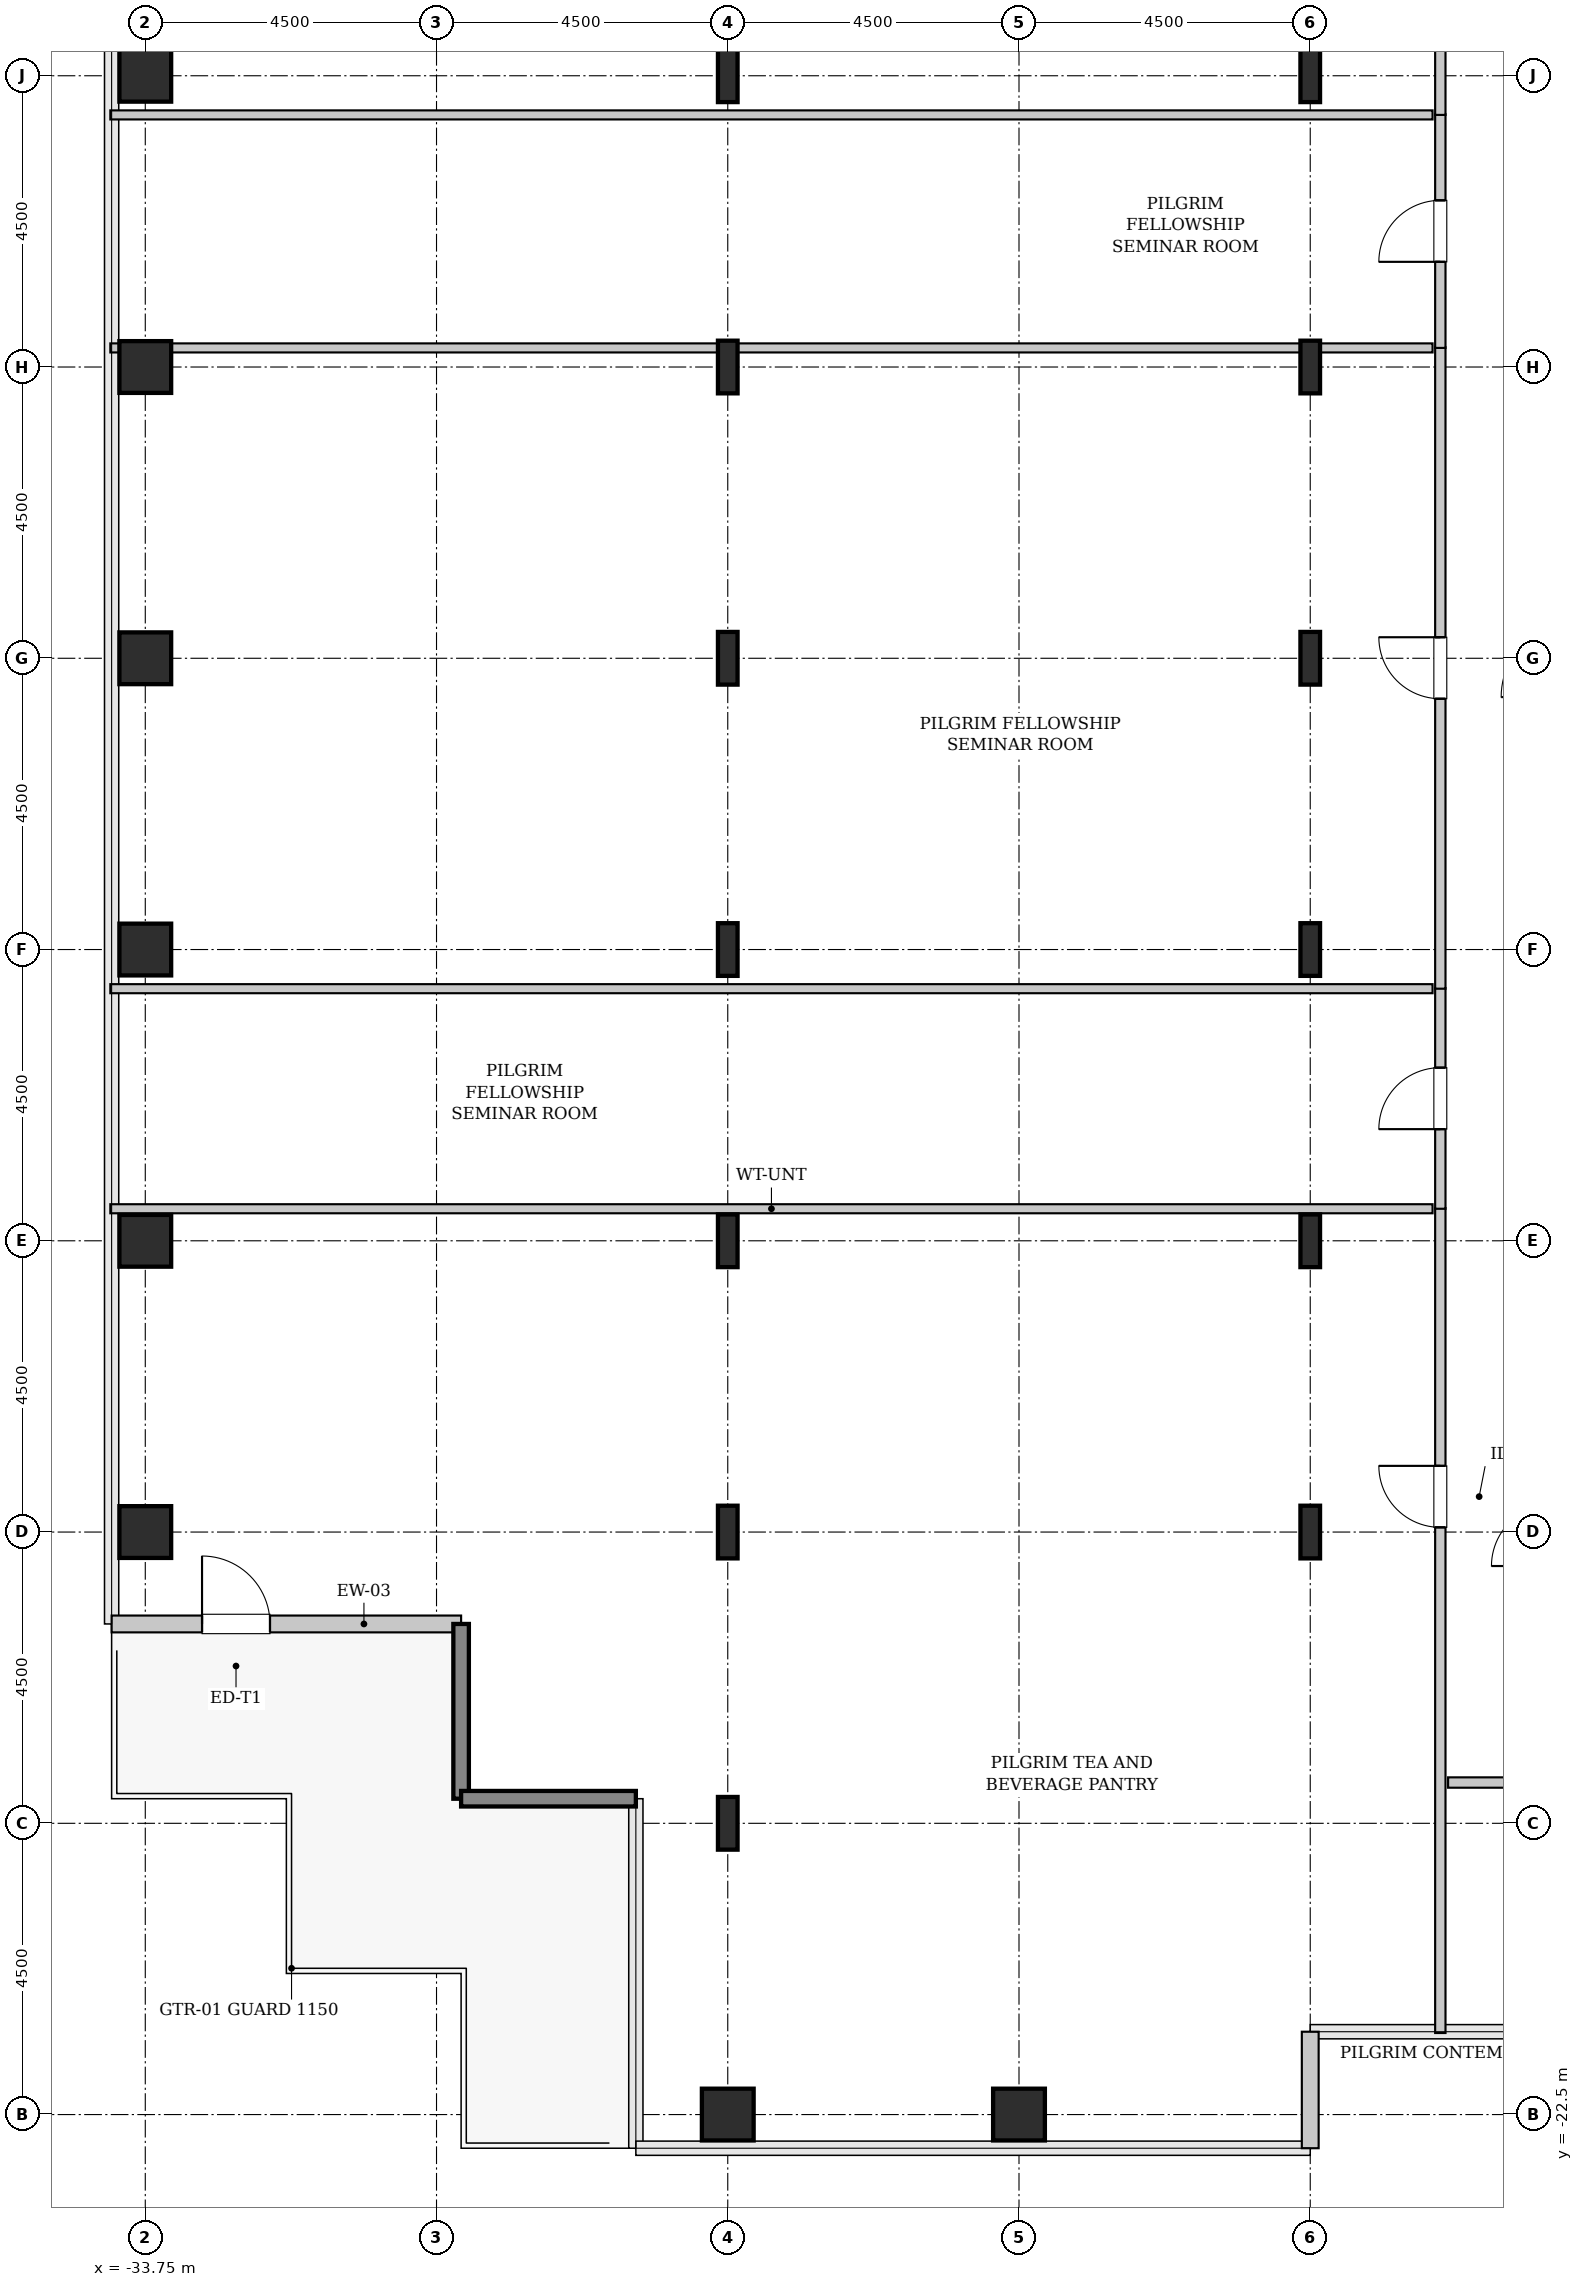
"""IFC4 building model, lengths in metres.
Left out: names, types, materials, properties, quantities, classifications, styles, units other than length and angle.
Written with IfcOpenShell. Run it as: python <this file> out.ifc"""

import sys

from ifc_helpers import new_model, si_unit, direction, frame, frame_2d, origin, origin_2d, place, context, subcontext, project, spatial, rectangle, hollow_rectangle, i_section, extrude, source, transform, mapped, element, fill, save


model = new_model("IFC4")
c1 = context("Model", 3, precision=1e-05, world=origin(), true_north=direction((0.0, 1.0)))
c2 = subcontext(c1, "Body", "Model", "MODEL_VIEW")
j1 = project(units=[si_unit("LENGTHUNIT", "METRE"), si_unit("PLANEANGLEUNIT", "RADIAN")], contexts=[c1])
p1 = place(None, origin())
s1 = spatial("IfcSite", under=j1, at=p1, CompositionType="ELEMENT")
p2 = place(p1, origin())
s2 = spatial("IfcBuilding", under=s1, at=p2, CompositionType="ELEMENT")
p3 = place(p2, frame((0.0, 0.0, 164.0)))
s3 = spatial("IfcBuildingStorey", under=s2, at=p3, CompositionType="ELEMENT", Elevation=164.0)
m1 = source(origin(), c2, "Body", "SweptSolid", [
    extrude(hollow_rectangle(XDim=0.8, YDim=0.8, WallThickness=0.04, InnerFilletRadius=0.04, OuterFilletRadius=0.08, at=origin_2d()), origin(), (0.0, 0.0, 1.0), 3.8),
])
for number, where, z_axis, x_axis in (
    (1, (-33.75, -13.5, 0.0), (0.0, 0.0, 1.0), (1.0, 0.0, 0.0)),
    (2, (-33.75, -9.0, 0.0), (0.0, 0.0, 1.0), (1.0, 0.0, 0.0)),
    (3, (-33.75, -4.5, 0.0), (0.0, 0.0, 1.0), (1.0, 0.0, 0.0)),
    (4, (-33.75, 0.0, 0.0), (0.0, 0.0, 1.0), (1.0, 0.0, 0.0)),
    (5, (-33.75, 4.5, 0.0), (0.0, 0.0, 1.0), (1.0, 0.0, 0.0)),
    (6, (-33.75, 9.0, 0.0), (0.0, 0.0, 1.0), (1.0, 0.0, 0.0)),
    (7, (-24.75, -22.5, 0.0), (0.0, 0.0, 1.0), (1.0, 0.0, 0.0)),
):
    element("IfcColumn", number, at=place(p3, frame(where, z_axis=z_axis, x_axis=x_axis)), inside=s3, PredefinedType="COLUMN", context=c2, shape_type="MappedRepresentation", body=[
        mapped(m1, transform((0.0, 0.0, 0.0), x_axis=(1.0, 0.0, 0.0), y_axis=(0.0, 1.0, 0.0), z_axis=(0.0, 0.0, 1.0), scale=1.0)),
    ])
m2 = source(origin(), c2, "Body", "SweptSolid", [
    extrude(i_section(OverallWidth=0.303, OverallDepth=0.814, WebThickness=0.021, FlangeThickness=0.04, FilletRadius=0.03, at=origin_2d()), origin(), (0.0, 0.0, 1.0), 3.8),
])
for number, where, z_axis, x_axis in (
    (8, (-24.75, -18.0, 0.0), (0.0, 0.0, 1.0), (1.0, 0.0, 0.0)),
    (9, (-24.75, -13.5, 0.0), (0.0, 0.0, 1.0), (1.0, 0.0, 0.0)),
    (10, (-24.75, -9.0, 0.0), (0.0, 0.0, 1.0), (1.0, 0.0, 0.0)),
    (11, (-24.75, -4.5, 0.0), (0.0, 0.0, 1.0), (1.0, 0.0, 0.0)),
    (12, (-24.75, 0.0, 0.0), (0.0, 0.0, 1.0), (1.0, 0.0, 0.0)),
    (13, (-24.75, 4.5, 0.0), (0.0, 0.0, 1.0), (1.0, 0.0, 0.0)),
    (14, (-24.75, 9.0, 0.0), (0.0, 0.0, 1.0), (1.0, 0.0, 0.0)),
):
    element("IfcColumn", number, at=place(p3, frame(where, z_axis=z_axis, x_axis=x_axis)), inside=s3, PredefinedType="COLUMN", context=c2, shape_type="MappedRepresentation", body=[
        mapped(m2, transform((0.0, 0.0, 0.0), x_axis=(1.0, 0.0, 0.0), y_axis=(0.0, 1.0, 0.0), z_axis=(0.0, 0.0, 1.0), scale=1.0)),
    ])
p4 = place(p3, frame((-20.25, -22.5, 0.0), z_axis=(0.0, 0.0, 1.0), x_axis=(1.0, 0.0, 0.0)))
e15 = element("IfcColumn", 15, at=p4, inside=s3, PredefinedType="COLUMN", context=c2, shape_type="MappedRepresentation", body=[
    mapped(m1, transform((0.0, 0.0, 0.0), x_axis=(1.0, 0.0, 0.0), y_axis=(0.0, 1.0, 0.0), z_axis=(0.0, 0.0, 1.0), scale=1.0)),
])
for number, where, z_axis, x_axis in (
    (16, (-15.75, -13.5, 0.0), (0.0, 0.0, 1.0), (1.0, 0.0, 0.0)),
    (17, (-15.75, -9.0, 0.0), (0.0, 0.0, 1.0), (1.0, 0.0, 0.0)),
    (18, (-15.75, -4.5, 0.0), (0.0, 0.0, 1.0), (1.0, 0.0, 0.0)),
    (19, (-15.75, 0.0, 0.0), (0.0, 0.0, 1.0), (1.0, 0.0, 0.0)),
    (20, (-15.75, 4.5, 0.0), (0.0, 0.0, 1.0), (1.0, 0.0, 0.0)),
    (21, (-15.75, 9.0, 0.0), (0.0, 0.0, 1.0), (1.0, 0.0, 0.0)),
):
    element("IfcColumn", number, at=place(p3, frame(where, z_axis=z_axis, x_axis=x_axis)), inside=s3, PredefinedType="COLUMN", context=c2, shape_type="MappedRepresentation", body=[
        mapped(m2, transform((0.0, 0.0, 0.0), x_axis=(1.0, 0.0, 0.0), y_axis=(0.0, 1.0, 0.0), z_axis=(0.0, 0.0, 1.0), scale=1.0)),
    ])
m3 = source(origin(), c2, "Body", "SweptSolid", [
    extrude(rectangle(XDim=5.4, YDim=0.26, at=frame_2d((2.7, 0.0))), origin(), (0.0, 0.0, 1.0), 3.55),
])
p5 = place(p3, frame((-34.27, -14.92, 0.0), z_axis=(0.0, 0.0, 1.0), x_axis=(1.0, 0.0, 0.0)))
e22 = element("IfcWall", 22, at=p5, inside=s3, PredefinedType="SOLIDWALL", context=c2, shape_type="MappedRepresentation", body=[
    mapped(m3, transform((0.0, 0.0, 0.0), x_axis=(1.0, 0.0, 0.0), y_axis=(0.0, 1.0, 0.0), z_axis=(0.0, 0.0, 1.0), scale=1.0)),
])
p6 = place(p5, frame((1.397, 0.0, 0.0)))
e23 = element("IfcOpeningElement", 23, at=p6, cuts=e22, PredefinedType="OPENING", context=c2, shape_type="SweptSolid", body=[
    extrude(rectangle(XDim=1.05, YDim=2.2, at=frame_2d((0.525, 1.1))), frame((0.0, 0.14, 0.0), z_axis=(0.0, -1.0, 0.0), x_axis=(1.0, 0.0, 0.0)), (0.0, 0.0, 1.0), 0.28),
])
m4 = source(origin(), c2, "Body", "SweptSolid", [
    extrude(rectangle(XDim=2.7, YDim=0.24, at=frame_2d((1.35, 0.0))), origin(), (0.0, 0.0, 1.0), 3.55),
])
for number, where, z_axis, x_axis in (
    (24, (-28.87, -14.92, 0.0), (0.0, 0.0, 1.0), (0.0, -1.0, 0.0)),
    (25, (-28.87, -17.62, 0.0), (0.0, 0.0, 1.0), (1.0, 0.0, 0.0)),
):
    element("IfcWall", number, at=place(p3, frame(where, z_axis=z_axis, x_axis=x_axis)), inside=s3, PredefinedType="SHEAR", context=c2, shape_type="MappedRepresentation", body=[
        mapped(m4, transform((0.0, 0.0, 0.0), x_axis=(1.0, 0.0, 0.0), y_axis=(0.0, 1.0, 0.0), z_axis=(0.0, 0.0, 1.0), scale=1.0)),
    ])
m5 = source(origin(), c2, "Body", "SweptSolid", [
    extrude(rectangle(XDim=1.8, YDim=0.26, at=frame_2d((0.9, 0.0))), origin(), (0.0, 0.0, 1.0), 3.55),
])
p7 = place(p3, frame((-15.75, -23.02, 0.0), z_axis=(0.0, 0.0, 1.0), x_axis=(0.0, 1.0, 0.0)))
e26 = element("IfcWall", 26, at=p7, inside=s3, PredefinedType="SOLIDWALL", context=c2, shape_type="MappedRepresentation", body=[
    mapped(m5, transform((0.0, 0.0, 0.0), x_axis=(1.0, 0.0, 0.0), y_axis=(0.0, 1.0, 0.0), z_axis=(0.0, 0.0, 1.0), scale=1.0)),
])
m6 = source(origin(), c2, "Body", "SweptSolid", [
    extrude(rectangle(XDim=12.745, YDim=0.16, at=frame_2d((6.373, 0.0))), origin(), (0.0, 0.0, 1.0), 3.535),
])
p8 = place(p3, frame((-13.74, -21.24, 0.0), z_axis=(0.0, 0.0, 1.0), x_axis=(0.0, 1.0, 0.0)))
e27 = element("IfcWall", 27, at=p8, inside=s3, PredefinedType="PARTITIONING", context=c2, shape_type="MappedRepresentation", body=[
    mapped(m6, transform((0.0, 0.0, 0.0), x_axis=(1.0, 0.0, 0.0), y_axis=(0.0, 1.0, 0.0), z_axis=(0.0, 0.0, 1.0), scale=1.0)),
])
p9 = place(p8, frame((7.812, 0.0, 0.0)))
e28 = element("IfcOpeningElement", 28, at=p9, cuts=e27, PredefinedType="OPENING", context=c2, shape_type="SweptSolid", body=[
    extrude(rectangle(XDim=0.95, YDim=2.1, at=frame_2d((0.475, 1.05))), frame((0.0, 0.09, 0.0), z_axis=(0.0, -1.0, 0.0), x_axis=(1.0, 0.0, 0.0)), (0.0, 0.0, 1.0), 0.18),
])
m7 = source(origin(), c2, "Body", "SweptSolid", [
    extrude(rectangle(XDim=20.43, YDim=0.14, at=frame_2d((10.215, 0.0))), origin(), (0.0, 0.0, 1.0), 2.875),
])
p10 = place(p3, frame((-34.29, -8.505, 0.0), z_axis=(0.0, 0.0, 1.0), x_axis=(1.0, 0.0, 0.0)))
e29 = element("IfcWall", 29, at=p10, inside=s3, PredefinedType="PARTITIONING", context=c2, shape_type="MappedRepresentation", body=[
    mapped(m7, transform((0.0, 0.0, 0.0), x_axis=(1.0, 0.0, 0.0), y_axis=(0.0, 1.0, 0.0), z_axis=(0.0, 0.0, 1.0), scale=1.0)),
])
m8 = source(origin(), c2, "Body", "SweptSolid", [
    extrude(rectangle(XDim=3.41, YDim=0.16, at=frame_2d((1.705, 0.0))), origin(), (0.0, 0.0, 1.0), 3.535),
])
p11 = place(p3, frame((-13.74, -8.505, 0.0), z_axis=(0.0, 0.0, 1.0), x_axis=(0.0, 1.0, 0.0)))
e30 = element("IfcWall", 30, at=p11, inside=s3, PredefinedType="PARTITIONING", context=c2, shape_type="MappedRepresentation", body=[
    mapped(m8, transform((0.0, 0.0, 0.0), x_axis=(1.0, 0.0, 0.0), y_axis=(0.0, 1.0, 0.0), z_axis=(0.0, 0.0, 1.0), scale=1.0)),
])
p12 = place(p11, frame((1.23, 0.0, 0.0)))
e31 = element("IfcOpeningElement", 31, at=p12, cuts=e30, PredefinedType="OPENING", context=c2, shape_type="SweptSolid", body=[
    extrude(rectangle(XDim=0.95, YDim=2.1, at=frame_2d((0.475, 1.05))), frame((0.0, 0.09, 0.0), z_axis=(0.0, -1.0, 0.0), x_axis=(1.0, 0.0, 0.0)), (0.0, 0.0, 1.0), 0.18),
])
m9 = source(origin(), c2, "Body", "SweptSolid", [
    extrude(rectangle(XDim=20.43, YDim=0.14, at=frame_2d((10.215, 0.0))), origin(), (0.0, 0.0, 1.0), 3.535),
])
p13 = place(p3, frame((-34.29, -5.105, 0.0), z_axis=(0.0, 0.0, 1.0), x_axis=(1.0, 0.0, 0.0)))
e32 = element("IfcWall", 32, at=p13, inside=s3, PredefinedType="PARTITIONING", context=c2, shape_type="MappedRepresentation", body=[
    mapped(m9, transform((0.0, 0.0, 0.0), x_axis=(1.0, 0.0, 0.0), y_axis=(0.0, 1.0, 0.0), z_axis=(0.0, 0.0, 1.0), scale=1.0)),
])
m10 = source(origin(), c2, "Body", "SweptSolid", [
    extrude(rectangle(XDim=9.91, YDim=0.16, at=frame_2d((4.955, 0.0))), origin(), (0.0, 0.0, 1.0), 3.535),
])
p14 = place(p3, frame((-13.74, -5.105, 0.0), z_axis=(0.0, 0.0, 1.0), x_axis=(0.0, 1.0, 0.0)))
e33 = element("IfcWall", 33, at=p14, inside=s3, PredefinedType="PARTITIONING", context=c2, shape_type="MappedRepresentation", body=[
    mapped(m10, transform((0.0, 0.0, 0.0), x_axis=(1.0, 0.0, 0.0), y_axis=(0.0, 1.0, 0.0), z_axis=(0.0, 0.0, 1.0), scale=1.0)),
])
p15 = place(p14, frame((4.48, 0.0, 0.0)))
e34 = element("IfcOpeningElement", 34, at=p15, cuts=e33, PredefinedType="OPENING", context=c2, shape_type="SweptSolid", body=[
    extrude(rectangle(XDim=0.95, YDim=2.1, at=frame_2d((0.475, 1.05))), frame((0.0, 0.09, 0.0), z_axis=(0.0, -1.0, 0.0), x_axis=(1.0, 0.0, 0.0)), (0.0, 0.0, 1.0), 0.18),
])
p16 = place(p3, frame((-34.29, 4.795, 0.0), z_axis=(0.0, 0.0, 1.0), x_axis=(1.0, 0.0, 0.0)))
e35 = element("IfcWall", 35, at=p16, inside=s3, PredefinedType="PARTITIONING", context=c2, shape_type="MappedRepresentation", body=[
    mapped(m7, transform((0.0, 0.0, 0.0), x_axis=(1.0, 0.0, 0.0), y_axis=(0.0, 1.0, 0.0), z_axis=(0.0, 0.0, 1.0), scale=1.0)),
])
m11 = source(origin(), c2, "Body", "SweptSolid", [
    extrude(rectangle(XDim=3.61, YDim=0.16, at=frame_2d((1.805, 0.0))), origin(), (0.0, 0.0, 1.0), 3.535),
])
p17 = place(p3, frame((-13.74, 4.795, 0.0), z_axis=(0.0, 0.0, 1.0), x_axis=(0.0, 1.0, 0.0)))
e36 = element("IfcWall", 36, at=p17, inside=s3, PredefinedType="PARTITIONING", context=c2, shape_type="MappedRepresentation", body=[
    mapped(m11, transform((0.0, 0.0, 0.0), x_axis=(1.0, 0.0, 0.0), y_axis=(0.0, 1.0, 0.0), z_axis=(0.0, 0.0, 1.0), scale=1.0)),
])
p18 = place(p17, frame((1.33, 0.0, 0.0)))
e37 = element("IfcOpeningElement", 37, at=p18, cuts=e36, PredefinedType="OPENING", context=c2, shape_type="SweptSolid", body=[
    extrude(rectangle(XDim=0.95, YDim=2.1, at=frame_2d((0.475, 1.05))), frame((0.0, 0.09, 0.0), z_axis=(0.0, -1.0, 0.0), x_axis=(1.0, 0.0, 0.0)), (0.0, 0.0, 1.0), 0.18),
])
p19 = place(p3, frame((-34.29, 8.395, 0.0), z_axis=(0.0, 0.0, 1.0), x_axis=(1.0, 0.0, 0.0)))
e38 = element("IfcWall", 38, at=p19, inside=s3, PredefinedType="PARTITIONING", context=c2, shape_type="MappedRepresentation", body=[
    mapped(m9, transform((0.0, 0.0, 0.0), x_axis=(1.0, 0.0, 0.0), y_axis=(0.0, 1.0, 0.0), z_axis=(0.0, 0.0, 1.0), scale=1.0)),
])
m12 = source(origin(), c2, "Body", "SweptSolid", [
    extrude(rectangle(XDim=12.845, YDim=0.16, at=frame_2d((6.422, 0.0))), origin(), (0.0, 0.0, 1.0), 3.535),
])
p20 = place(p3, frame((-13.74, 8.395, 0.0), z_axis=(0.0, 0.0, 1.0), x_axis=(0.0, 1.0, 0.0)))
e39 = element("IfcWall", 39, at=p20, inside=s3, PredefinedType="PARTITIONING", context=c2, shape_type="MappedRepresentation", body=[
    mapped(m12, transform((0.0, 0.0, 0.0), x_axis=(1.0, 0.0, 0.0), y_axis=(0.0, 1.0, 0.0), z_axis=(0.0, 0.0, 1.0), scale=1.0)),
])
p21 = place(p20, frame((4.032, 0.0, 0.0)))
e40 = element("IfcOpeningElement", 40, at=p21, cuts=e39, PredefinedType="OPENING", context=c2, shape_type="SweptSolid", body=[
    extrude(rectangle(XDim=0.95, YDim=2.1, at=frame_2d((0.475, 1.05))), frame((0.0, 0.09, 0.0), z_axis=(0.0, -1.0, 0.0), x_axis=(1.0, 0.0, 0.0)), (0.0, 0.0, 1.0), 0.18),
])
m13 = source(origin(), c2, "Body", "SweptSolid", [
    extrude(rectangle(XDim=5.025, YDim=0.16, at=frame_2d((2.513, 0.0))), origin(), (0.0, 0.0, 1.0), 3.535),
])
p22 = place(p3, frame((-13.62, -17.37, 0.0), z_axis=(0.0, 0.0, 1.0), x_axis=(1.0, 0.0, 0.0)))
e41 = element("IfcWall", 41, at=p22, inside=s3, PredefinedType="PARTITIONING", context=c2, shape_type="MappedRepresentation", body=[
    mapped(m13, transform((0.0, 0.0, 0.0), x_axis=(1.0, 0.0, 0.0), y_axis=(0.0, 1.0, 0.0), z_axis=(0.0, 0.0, 1.0), scale=1.0)),
])
p23 = place(p22, frame((2.881, 0.0, 0.0)))
e42 = element("IfcOpeningElement", 42, at=p23, cuts=e41, PredefinedType="OPENING", context=c2, shape_type="SweptSolid", body=[
    extrude(rectangle(XDim=0.95, YDim=2.1, at=frame_2d((0.475, 1.05))), frame((0.0, 0.09, 0.0), z_axis=(0.0, -1.0, 0.0), x_axis=(1.0, 0.0, 0.0)), (0.0, 0.0, 1.0), 0.18),
])
m14 = source(origin(), c2, "Body", "SweptSolid", [
    extrude(rectangle(XDim=1.05, YDim=2.2, at=frame_2d((0.525, 1.1))), frame((0.0, 0.025, 0.0), z_axis=(0.0, -1.0, 0.0), x_axis=(1.0, 0.0, 0.0)), (0.0, 0.0, 1.0), 0.05),
])
p24 = place(p6, origin())
e43 = element("IfcDoor", 43, at=p24, inside=s3, OperationType="SINGLE_SWING_LEFT", PredefinedType="DOOR", context=c2, shape_type="MappedRepresentation", body=[
    mapped(m14, transform((0.0, 0.0, 0.0), x_axis=(1.0, 0.0, 0.0), y_axis=(0.0, 1.0, 0.0), z_axis=(0.0, 0.0, 1.0), scale=1.0)),
])
fill(e23, e43)
m15 = source(origin(), c2, "Body", "SweptSolid", [
    extrude(rectangle(XDim=0.95, YDim=2.1, at=frame_2d((0.475, 1.05))), frame((0.0, 0.025, 0.0), z_axis=(0.0, -1.0, 0.0), x_axis=(1.0, 0.0, 0.0)), (0.0, 0.0, 1.0), 0.05),
])
p25 = place(p9, origin())
e44 = element("IfcDoor", 44, at=p25, inside=s3, OperationType="SINGLE_SWING_RIGHT", PredefinedType="DOOR", context=c2, shape_type="MappedRepresentation", body=[
    mapped(m15, transform((0.0, 0.0, 0.0), x_axis=(1.0, 0.0, 0.0), y_axis=(0.0, 1.0, 0.0), z_axis=(0.0, 0.0, 1.0), scale=1.0)),
])
fill(e28, e44)
p26 = place(p12, origin())
e45 = element("IfcDoor", 45, at=p26, inside=s3, OperationType="SINGLE_SWING_LEFT", PredefinedType="DOOR", context=c2, shape_type="MappedRepresentation", body=[
    mapped(m15, transform((0.0, 0.0, 0.0), x_axis=(1.0, 0.0, 0.0), y_axis=(0.0, 1.0, 0.0), z_axis=(0.0, 0.0, 1.0), scale=1.0)),
])
fill(e31, e45)
p27 = place(p15, origin())
e46 = element("IfcDoor", 46, at=p27, inside=s3, OperationType="SINGLE_SWING_RIGHT", PredefinedType="DOOR", context=c2, shape_type="MappedRepresentation", body=[
    mapped(m15, transform((0.0, 0.0, 0.0), x_axis=(1.0, 0.0, 0.0), y_axis=(0.0, 1.0, 0.0), z_axis=(0.0, 0.0, 1.0), scale=1.0)),
])
fill(e34, e46)
p28 = place(p18, origin())
e47 = element("IfcDoor", 47, at=p28, inside=s3, OperationType="SINGLE_SWING_LEFT", PredefinedType="DOOR", context=c2, shape_type="MappedRepresentation", body=[
    mapped(m15, transform((0.0, 0.0, 0.0), x_axis=(1.0, 0.0, 0.0), y_axis=(0.0, 1.0, 0.0), z_axis=(0.0, 0.0, 1.0), scale=1.0)),
])
fill(e37, e47)
save(model, sys.argv[1])
